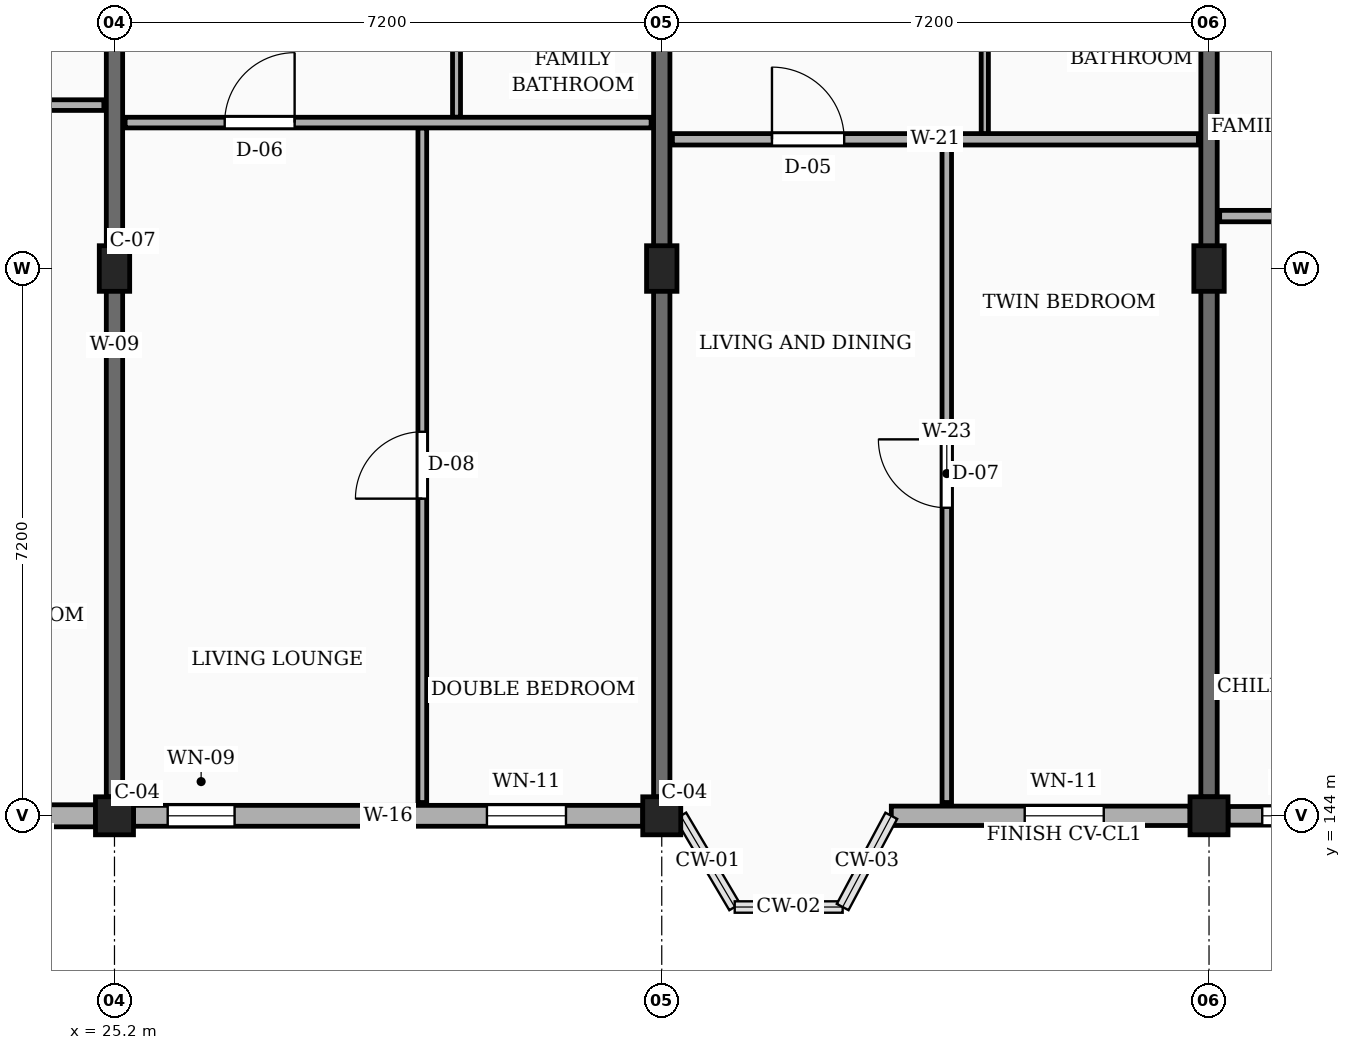
"""IFC4 building model, lengths in metres.
Left out: names, types, materials, properties, quantities, classifications, styles, units other than length and angle.
Written with IfcOpenShell. Run it as: python <this file> out.ifc"""

import sys

from ifc_helpers import new_model, si_unit, direction, frame, frame_2d, origin, origin_2d, place, context, subcontext, project, spatial, rectangle, extrude, element, fill, save


model = new_model("IFC4")
c1 = context("Model", 3, precision=1e-05, world=origin(), true_north=direction((0.0, 1.0)))
c2 = subcontext(c1, "Body", "Model", "MODEL_VIEW")
j1 = project(units=[si_unit("LENGTHUNIT", "METRE"), si_unit("PLANEANGLEUNIT", "RADIAN")], contexts=[c1])
p1 = place(None, origin())
s1 = spatial("IfcSite", under=j1, at=p1, CompositionType="ELEMENT")
p2 = place(p1, origin())
s2 = spatial("IfcBuilding", under=s1, at=p2, CompositionType="ELEMENT")
p3 = place(p2, frame((0.0, 0.0, 29.7)))
s3 = spatial("IfcBuildingStorey", under=s2, at=p3, CompositionType="ELEMENT", Elevation=29.7)
p4 = place(p3, frame((25.2, 144.0, 0.0), z_axis=(0.0, 0.0, 1.0), x_axis=(1.0, 0.0, 0.0)))
e1 = element("IfcColumn", 1, at=p4, inside=s3, PredefinedType="COLUMN", context=c2, shape_type="SweptSolid", body=[
    extrude(rectangle(XDim=0.5, YDim=0.5, at=origin_2d()), origin(), (0.0, 0.0, 1.0), 3.15),
])
p5 = place(p3, frame((25.2, 151.2, 0.0), z_axis=(0.0, 0.0, 1.0), x_axis=(1.0, 0.0, 0.0)))
e2 = element("IfcColumn", 2, at=p5, inside=s3, PredefinedType="COLUMN", context=c2, shape_type="SweptSolid", body=[
    extrude(rectangle(XDim=0.4, YDim=0.6, at=origin_2d()), origin(), (0.0, 0.0, 1.0), 3.15),
])
p6 = place(p3, frame((32.4, 144.0, 0.0), z_axis=(0.0, 0.0, 1.0), x_axis=(1.0, 0.0, 0.0)))
e3 = element("IfcColumn", 3, at=p6, inside=s3, PredefinedType="COLUMN", context=c2, shape_type="SweptSolid", body=[
    extrude(rectangle(XDim=0.5, YDim=0.5, at=origin_2d()), origin(), (0.0, 0.0, 1.0), 3.15),
])
p7 = place(p3, frame((32.4, 151.2, 0.0), z_axis=(0.0, 0.0, 1.0), x_axis=(1.0, 0.0, 0.0)))
e4 = element("IfcColumn", 4, at=p7, inside=s3, PredefinedType="COLUMN", context=c2, shape_type="SweptSolid", body=[
    extrude(rectangle(XDim=0.4, YDim=0.6, at=origin_2d()), origin(), (0.0, 0.0, 1.0), 3.15),
])
p8 = place(p3, frame((39.6, 144.0, 0.0), z_axis=(0.0, 0.0, 1.0), x_axis=(1.0, 0.0, 0.0)))
e5 = element("IfcColumn", 5, at=p8, inside=s3, PredefinedType="COLUMN", context=c2, shape_type="SweptSolid", body=[
    extrude(rectangle(XDim=0.5, YDim=0.5, at=origin_2d()), origin(), (0.0, 0.0, 1.0), 3.15),
])
p9 = place(p3, frame((39.6, 151.2, 0.0), z_axis=(0.0, 0.0, 1.0), x_axis=(1.0, 0.0, 0.0)))
e6 = element("IfcColumn", 6, at=p9, inside=s3, PredefinedType="COLUMN", context=c2, shape_type="SweptSolid", body=[
    extrude(rectangle(XDim=0.4, YDim=0.6, at=origin_2d()), origin(), (0.0, 0.0, 1.0), 3.15),
])
for number, where, z_axis, x_axis in (
    (7, (25.2, 144.25, 0.0), (0.0, 0.0, 1.0), (0.0, 1.0, 0.0)),
    (8, (32.4, 144.25, 0.0), (0.0, 0.0, 1.0), (0.0, 1.0, 0.0)),
    (9, (39.6, 144.25, 0.0), (0.0, 0.0, 1.0), (0.0, 1.0, 0.0)),
):
    element("IfcWall", number, at=place(p3, frame(where, z_axis=z_axis, x_axis=x_axis)), inside=s3, PredefinedType="SOLIDWALL", context=c2, shape_type="SweptSolid", body=[
        extrude(rectangle(XDim=11.9, YDim=0.215, at=frame_2d((5.95, 0.0))), origin(), (0.0, 0.0, 1.0), 2.185),
    ])
p10 = place(p3, frame((21.02, 144.0, 0.0), z_axis=(0.0, 0.0, 1.0), x_axis=(1.0, 0.0, 0.0)))
e10 = element("IfcWall", 10, at=p10, inside=s3, PredefinedType="SOLIDWALL", context=c2, shape_type="SweptSolid", body=[
    extrude(rectangle(XDim=3.93, YDim=0.29, at=frame_2d((1.965, 0.0))), origin(), (0.0, 0.0, 1.0), 2.455),
])
p11 = place(p10, frame((1.625, 0.0, 0.78)))
e11 = element("IfcOpeningElement", 11, at=p11, cuts=e10, PredefinedType="OPENING", context=c2, shape_type="SweptSolid", body=[
    extrude(rectangle(XDim=1.4, YDim=1.15, at=frame_2d((0.7, 0.575))), frame((0.0, 0.155, 0.0), z_axis=(0.0, -1.0, 0.0), x_axis=(1.0, 0.0, 0.0)), (0.0, 0.0, 1.0), 0.31),
])
p12 = place(p3, frame((25.45, 144.0, 0.0), z_axis=(0.0, 0.0, 1.0), x_axis=(1.0, 0.0, 0.0)))
e12 = element("IfcWall", 12, at=p12, inside=s3, PredefinedType="SOLIDWALL", context=c2, shape_type="SweptSolid", body=[
    extrude(rectangle(XDim=6.7, YDim=0.275, at=frame_2d((3.35, 0.0))), origin(), (0.0, 0.0, 1.0), 2.455),
])
p13 = place(p12, frame((0.45, 0.0, 0.78)))
e13 = element("IfcOpeningElement", 13, at=p13, cuts=e12, PredefinedType="OPENING", context=c2, shape_type="SweptSolid", body=[
    extrude(rectangle(XDim=0.88, YDim=1.26, at=frame_2d((0.44, 0.63))), frame((0.0, 0.147, 0.0), z_axis=(0.0, -1.0, 0.0), x_axis=(1.0, 0.0, 0.0)), (0.0, 0.0, 1.0), 0.295),
])
p14 = place(p12, frame((4.65, 0.0, 0.78)))
e14 = element("IfcOpeningElement", 14, at=p14, cuts=e12, PredefinedType="OPENING", context=c2, shape_type="SweptSolid", body=[
    extrude(rectangle(XDim=1.04, YDim=1.26, at=frame_2d((0.52, 0.63))), frame((0.0, 0.147, 0.0), z_axis=(0.0, -1.0, 0.0), x_axis=(1.0, 0.0, 0.0)), (0.0, 0.0, 1.0), 0.295),
])
p15 = place(p3, frame((35.42, 144.0, 0.0), z_axis=(0.0, 0.0, 1.0), x_axis=(1.0, 0.0, 0.0)))
e15 = element("IfcWall", 15, at=p15, inside=s3, PredefinedType="SOLIDWALL", context=c2, shape_type="SweptSolid", body=[
    extrude(rectangle(XDim=3.93, YDim=0.255, at=frame_2d((1.965, 0.0))), origin(), (0.0, 0.0, 1.0), 2.455),
])
p16 = place(p15, frame((1.755, 0.0, 0.78)))
e16 = element("IfcOpeningElement", 16, at=p16, cuts=e15, PredefinedType="OPENING", context=c2, shape_type="SweptSolid", body=[
    extrude(rectangle(XDim=1.04, YDim=1.26, at=frame_2d((0.52, 0.63))), frame((0.0, 0.137, 0.0), z_axis=(0.0, -1.0, 0.0), x_axis=(1.0, 0.0, 0.0)), (0.0, 0.0, 1.0), 0.275),
])
p17 = place(p3, frame((39.85, 144.0, 0.0), z_axis=(0.0, 0.0, 1.0), x_axis=(1.0, 0.0, 0.0)))
e17 = element("IfcWall", 17, at=p17, inside=s3, PredefinedType="SOLIDWALL", context=c2, shape_type="SweptSolid", body=[
    extrude(rectangle(XDim=6.7, YDim=0.245, at=frame_2d((3.35, 0.0))), origin(), (0.0, 0.0, 1.0), 2.455),
])
p18 = place(p17, frame((0.45, 0.0, 0.78)))
e18 = element("IfcOpeningElement", 18, at=p18, cuts=e17, PredefinedType="OPENING", context=c2, shape_type="SweptSolid", body=[
    extrude(rectangle(XDim=1.12, YDim=1.26, at=frame_2d((0.56, 0.63))), frame((0.0, 0.133, 0.0), z_axis=(0.0, -1.0, 0.0), x_axis=(1.0, 0.0, 0.0)), (0.0, 0.0, 1.0), 0.265),
])
p19 = place(p17, frame((4.65, 0.0, 0.78)))
e19 = element("IfcOpeningElement", 19, at=p19, cuts=e17, PredefinedType="OPENING", context=c2, shape_type="SweptSolid", body=[
    extrude(rectangle(XDim=1.28, YDim=1.26, at=frame_2d((0.64, 0.63))), frame((0.0, 0.133, 0.0), z_axis=(0.0, -1.0, 0.0), x_axis=(1.0, 0.0, 0.0)), (0.0, 0.0, 1.0), 0.265),
])
p20 = place(p3, frame((18.14, 153.35, 0.0), z_axis=(0.0, 0.0, 1.0), x_axis=(1.0, 0.0, 0.0)))
e20 = element("IfcWall", 20, at=p20, inside=s3, PredefinedType="PARTITIONING", context=c2, shape_type="SweptSolid", body=[
    extrude(rectangle(XDim=6.92, YDim=0.14, at=frame_2d((3.46, 0.0))), origin(), (0.0, 0.0, 1.0), 2.32),
])
p21 = place(p20, frame((1.31, 0.0, 0.0)))
e21 = element("IfcOpeningElement", 21, at=p21, cuts=e20, PredefinedType="OPENING", context=c2, shape_type="SweptSolid", body=[
    extrude(rectangle(XDim=0.95, YDim=2.1, at=frame_2d((0.475, 1.05))), frame((0.0, 0.08, 0.0), z_axis=(0.0, -1.0, 0.0), x_axis=(1.0, 0.0, 0.0)), (0.0, 0.0, 1.0), 0.16),
])
p22 = place(p3, frame((29.25, 144.175, 0.0), z_axis=(0.0, 0.0, 1.0), x_axis=(0.0, 1.0, 0.0)))
e22 = element("IfcWall", 22, at=p22, inside=s3, PredefinedType="PARTITIONING", context=c2, shape_type="SweptSolid", body=[
    extrude(rectangle(XDim=8.875, YDim=0.115, at=frame_2d((4.438, 0.0))), origin(), (0.0, 0.0, 1.0), 2.32),
])
p23 = place(p22, frame((3.998, 0.0, 0.0)))
e23 = element("IfcOpeningElement", 23, at=p23, cuts=e22, PredefinedType="OPENING", context=c2, shape_type="SweptSolid", body=[
    extrude(rectangle(XDim=0.88, YDim=2.08, at=frame_2d((0.44, 1.04))), frame((0.0, 0.067, 0.0), z_axis=(0.0, -1.0, 0.0), x_axis=(1.0, 0.0, 0.0)), (0.0, 0.0, 1.0), 0.135),
])
p24 = place(p3, frame((29.7, 153.19, 0.0), z_axis=(0.0, 0.0, 1.0), x_axis=(0.0, 1.0, 0.0)))
e24 = element("IfcWall", 24, at=p24, inside=s3, PredefinedType="PARTITIONING", context=c2, shape_type="SweptSolid", body=[
    extrude(rectangle(XDim=3.02, YDim=0.105, at=frame_2d((1.51, 0.0))), origin(), (0.0, 0.0, 1.0), 2.32),
])
p25 = place(p24, frame((1.075, 0.0, 0.0)))
e25 = element("IfcOpeningElement", 25, at=p25, cuts=e24, PredefinedType="OPENING", context=c2, shape_type="SweptSolid", body=[
    extrude(rectangle(XDim=0.87, YDim=2.05, at=frame_2d((0.435, 1.025))), frame((0.0, 0.062, 0.0), z_axis=(0.0, -1.0, 0.0), x_axis=(1.0, 0.0, 0.0)), (0.0, 0.0, 1.0), 0.125),
])
p26 = place(p3, frame((25.34, 153.12, 0.0), z_axis=(0.0, 0.0, 1.0), x_axis=(1.0, 0.0, 0.0)))
e26 = element("IfcWall", 26, at=p26, inside=s3, PredefinedType="PARTITIONING", context=c2, shape_type="SweptSolid", body=[
    extrude(rectangle(XDim=6.92, YDim=0.14, at=frame_2d((3.46, 0.0))), origin(), (0.0, 0.0, 1.0), 2.32),
])
p27 = place(p26, frame((1.31, 0.0, 0.0)))
e27 = element("IfcOpeningElement", 27, at=p27, cuts=e26, PredefinedType="OPENING", context=c2, shape_type="SweptSolid", body=[
    extrude(rectangle(XDim=0.92, YDim=2.1, at=frame_2d((0.46, 1.05))), frame((0.0, 0.08, 0.0), z_axis=(0.0, -1.0, 0.0), x_axis=(1.0, 0.0, 0.0)), (0.0, 0.0, 1.0), 0.16),
])
p28 = place(p3, frame((36.15, 144.175, 0.0), z_axis=(0.0, 0.0, 1.0), x_axis=(0.0, 1.0, 0.0)))
e28 = element("IfcWall", 28, at=p28, inside=s3, PredefinedType="PARTITIONING", context=c2, shape_type="SweptSolid", body=[
    extrude(rectangle(XDim=8.655, YDim=0.125, at=frame_2d((4.328, 0.0))), origin(), (0.0, 0.0, 1.0), 2.32),
])
p29 = place(p28, frame((3.877, 0.0, 0.0)))
e29 = element("IfcOpeningElement", 29, at=p29, cuts=e28, PredefinedType="OPENING", context=c2, shape_type="SweptSolid", body=[
    extrude(rectangle(XDim=0.9, YDim=2.1, at=frame_2d((0.45, 1.05))), frame((0.0, 0.073, 0.0), z_axis=(0.0, -1.0, 0.0), x_axis=(1.0, 0.0, 0.0)), (0.0, 0.0, 1.0), 0.145),
])
p30 = place(p3, frame((36.65, 152.97, 0.0), z_axis=(0.0, 0.0, 1.0), x_axis=(0.0, 1.0, 0.0)))
e30 = element("IfcWall", 30, at=p30, inside=s3, PredefinedType="PARTITIONING", context=c2, shape_type="SweptSolid", body=[
    extrude(rectangle(XDim=3.24, YDim=0.095, at=frame_2d((1.62, 0.0))), origin(), (0.0, 0.0, 1.0), 2.32),
])
p31 = place(p30, frame((1.17, 0.0, 0.0)))
e31 = element("IfcOpeningElement", 31, at=p31, cuts=e30, PredefinedType="OPENING", context=c2, shape_type="SweptSolid", body=[
    extrude(rectangle(XDim=0.9, YDim=2.05, at=frame_2d((0.45, 1.025))), frame((0.0, 0.058, 0.0), z_axis=(0.0, -1.0, 0.0), x_axis=(1.0, 0.0, 0.0)), (0.0, 0.0, 1.0), 0.115),
])
p32 = place(p3, frame((32.54, 152.9, 0.0), z_axis=(0.0, 0.0, 1.0), x_axis=(1.0, 0.0, 0.0)))
e32 = element("IfcWall", 32, at=p32, inside=s3, PredefinedType="PARTITIONING", context=c2, shape_type="SweptSolid", body=[
    extrude(rectangle(XDim=6.92, YDim=0.15, at=frame_2d((3.46, 0.0))), origin(), (0.0, 0.0, 1.0), 2.32),
])
p33 = place(p32, frame((1.31, 0.0, 0.0)))
e33 = element("IfcOpeningElement", 33, at=p33, cuts=e32, PredefinedType="OPENING", context=c2, shape_type="SweptSolid", body=[
    extrude(rectangle(XDim=0.95, YDim=2.1, at=frame_2d((0.475, 1.05))), frame((0.0, 0.085, 0.0), z_axis=(0.0, -1.0, 0.0), x_axis=(1.0, 0.0, 0.0)), (0.0, 0.0, 1.0), 0.17),
])
p34 = place(p3, frame((39.74, 151.89, 0.0), z_axis=(0.0, 0.0, 1.0), x_axis=(1.0, 0.0, 0.0)))
e34 = element("IfcWall", 34, at=p34, inside=s3, PredefinedType="PARTITIONING", context=c2, shape_type="SweptSolid", body=[
    extrude(rectangle(XDim=6.92, YDim=0.15, at=frame_2d((3.46, 0.0))), origin(), (0.0, 0.0, 1.0), 2.32),
])
p35 = place(p34, frame((4.66, 0.0, 0.0)))
e35 = element("IfcOpeningElement", 35, at=p35, cuts=e34, PredefinedType="OPENING", context=c2, shape_type="SweptSolid", body=[
    extrude(rectangle(XDim=0.92, YDim=2.1, at=frame_2d((0.46, 1.05))), frame((0.0, 0.085, 0.0), z_axis=(0.0, -1.0, 0.0), x_axis=(1.0, 0.0, 0.0)), (0.0, 0.0, 1.0), 0.17),
])
p36 = place(p13, origin())
e36 = element("IfcWindow", 36, at=p36, inside=s3, PartitioningType="SINGLE_PANEL", PredefinedType="WINDOW", context=c2, shape_type="SweptSolid", body=[
    extrude(rectangle(XDim=0.88, YDim=1.26, at=frame_2d((0.44, 0.63))), frame((0.0, 0.03, 0.0), z_axis=(0.0, -1.0, 0.0), x_axis=(1.0, 0.0, 0.0)), (0.0, 0.0, 1.0), 0.06),
])
fill(e13, e36)
p37 = place(p14, origin())
e37 = element("IfcWindow", 37, at=p37, inside=s3, PartitioningType="SINGLE_PANEL", PredefinedType="WINDOW", context=c2, shape_type="SweptSolid", body=[
    extrude(rectangle(XDim=1.04, YDim=1.26, at=frame_2d((0.52, 0.63))), frame((0.0, 0.03, 0.0), z_axis=(0.0, -1.0, 0.0), x_axis=(1.0, 0.0, 0.0)), (0.0, 0.0, 1.0), 0.06),
])
fill(e14, e37)
p38 = place(p16, origin())
e38 = element("IfcWindow", 38, at=p38, inside=s3, PartitioningType="SINGLE_PANEL", PredefinedType="WINDOW", context=c2, shape_type="SweptSolid", body=[
    extrude(rectangle(XDim=1.04, YDim=1.26, at=frame_2d((0.52, 0.63))), frame((0.0, 0.03, 0.0), z_axis=(0.0, -1.0, 0.0), x_axis=(1.0, 0.0, 0.0)), (0.0, 0.0, 1.0), 0.06),
])
fill(e16, e38)
p39 = place(p18, origin())
e39 = element("IfcWindow", 39, at=p39, inside=s3, PartitioningType="SINGLE_PANEL", PredefinedType="WINDOW", context=c2, shape_type="SweptSolid", body=[
    extrude(rectangle(XDim=1.12, YDim=1.26, at=frame_2d((0.56, 0.63))), frame((0.0, 0.03, 0.0), z_axis=(0.0, -1.0, 0.0), x_axis=(1.0, 0.0, 0.0)), (0.0, 0.0, 1.0), 0.06),
])
fill(e18, e39)
p40 = place(p23, origin())
e40 = element("IfcDoor", 40, at=p40, inside=s3, OperationType="SINGLE_SWING_LEFT", PredefinedType="DOOR", context=c2, shape_type="SweptSolid", body=[
    extrude(rectangle(XDim=0.88, YDim=2.08, at=frame_2d((0.44, 1.04))), frame((0.0, 0.025, 0.0), z_axis=(0.0, -1.0, 0.0), x_axis=(1.0, 0.0, 0.0)), (0.0, 0.0, 1.0), 0.05),
])
fill(e23, e40)
p41 = place(p27, origin())
e41 = element("IfcDoor", 41, at=p41, inside=s3, OperationType="SINGLE_SWING_RIGHT", PredefinedType="DOOR", context=c2, shape_type="SweptSolid", body=[
    extrude(rectangle(XDim=0.92, YDim=2.1, at=frame_2d((0.46, 1.05))), frame((0.0, 0.025, 0.0), z_axis=(0.0, -1.0, 0.0), x_axis=(1.0, 0.0, 0.0)), (0.0, 0.0, 1.0), 0.05),
])
fill(e27, e41)
p42 = place(p29, origin())
e42 = element("IfcDoor", 42, at=p42, inside=s3, OperationType="SINGLE_SWING_RIGHT", PredefinedType="DOOR", context=c2, shape_type="SweptSolid", body=[
    extrude(rectangle(XDim=0.9, YDim=2.1, at=frame_2d((0.45, 1.05))), frame((0.0, 0.025, 0.0), z_axis=(0.0, -1.0, 0.0), x_axis=(1.0, 0.0, 0.0)), (0.0, 0.0, 1.0), 0.05),
])
fill(e29, e42)
p43 = place(p33, origin())
e43 = element("IfcDoor", 43, at=p43, inside=s3, OperationType="SINGLE_SWING_LEFT", PredefinedType="DOOR", context=c2, shape_type="SweptSolid", body=[
    extrude(rectangle(XDim=0.95, YDim=2.1, at=frame_2d((0.475, 1.05))), frame((0.0, 0.025, 0.0), z_axis=(0.0, -1.0, 0.0), x_axis=(1.0, 0.0, 0.0)), (0.0, 0.0, 1.0), 0.05),
])
fill(e33, e43)
save(model, sys.argv[1])
